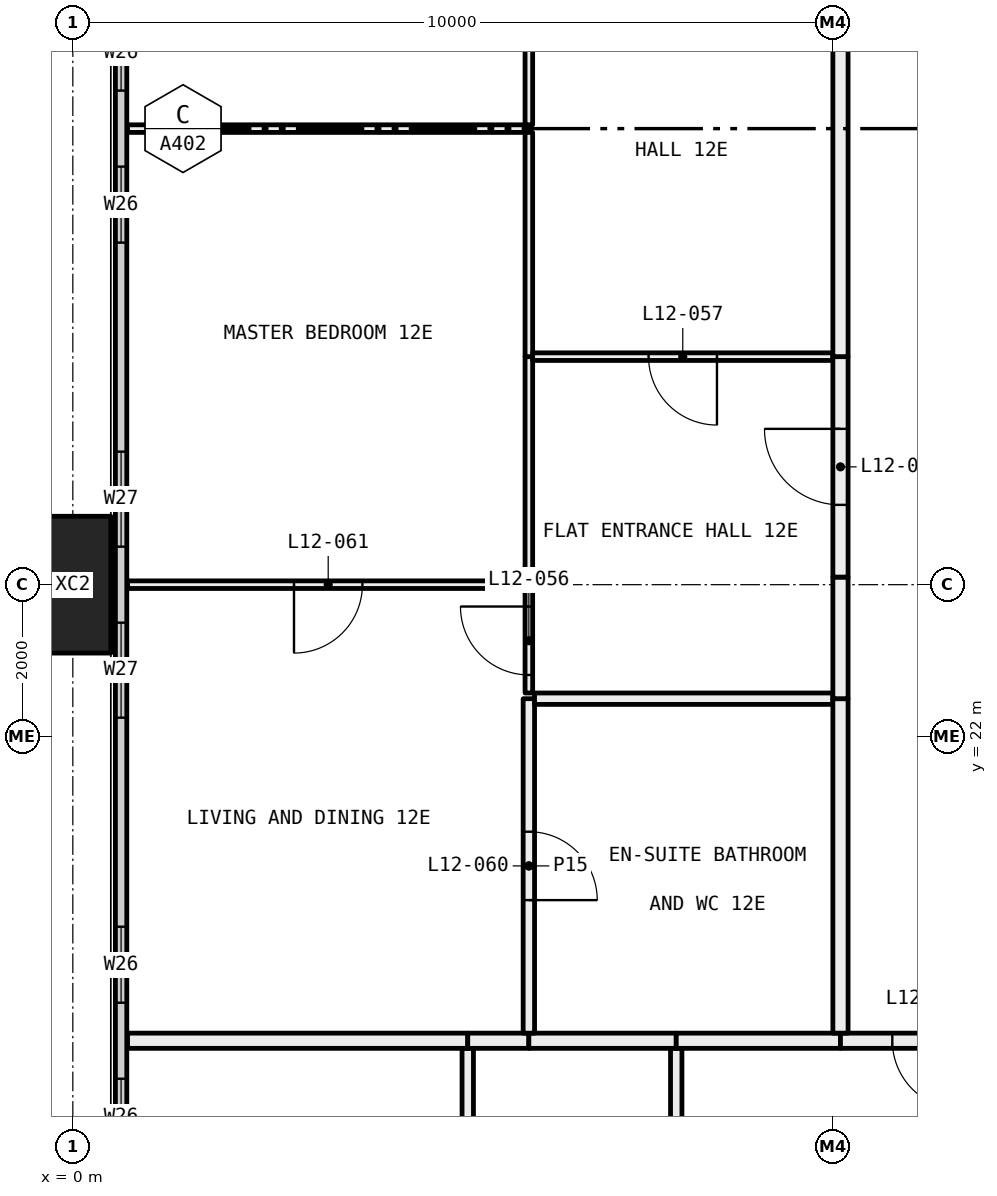
"""IFC4 building model, lengths in metres.
Left out: names, types, materials, properties, quantities, classifications, styles, units other than length and angle.
Written with IfcOpenShell. Run it as: python <this file> out.ifc"""

import sys

from ifc_helpers import new_model, si_unit, direction, frame, frame_2d, origin, origin_2d, place, context, subcontext, project, spatial, rectangle, hollow_rectangle, extrude, element, fill, save


model = new_model("IFC4")
c1 = context("Model", 3, precision=1e-05, world=origin(), true_north=direction((0.0, 1.0)))
c2 = subcontext(c1, "Body", "Model", "MODEL_VIEW")
j1 = project(units=[si_unit("LENGTHUNIT", "METRE"), si_unit("PLANEANGLEUNIT", "RADIAN")], contexts=[c1])
p1 = place(None, origin())
s1 = spatial("IfcSite", under=j1, at=p1, CompositionType="ELEMENT")
p2 = place(p1, origin())
s2 = spatial("IfcBuilding", under=s1, at=p2, CompositionType="ELEMENT")
p3 = place(p2, frame((0.0, 0.0, 54.15)))
s3 = spatial("IfcBuildingStorey", under=s2, at=p3, CompositionType="ELEMENT", Elevation=54.15)
p4 = place(p3, frame((0.0, 24.0, -0.4), z_axis=(0.0, 0.0, 1.0), x_axis=(0.0, 1.0, 0.0)))
e1 = element("IfcColumn", 1, at=p4, inside=s3, PredefinedType="COLUMN", context=c2, shape_type="SweptSolid", body=[
    extrude(hollow_rectangle(XDim=1.8, YDim=1.0, WallThickness=0.07, at=origin_2d()), origin(), (0.0, 0.0, 1.0), 3.45),
])
p5 = place(p3, frame((0.635, 6.71, 0.0), z_axis=(0.0, 0.0, 1.0), x_axis=(0.0, 1.0, 0.0)))
e2 = element("IfcWall", 2, at=p5, inside=s3, PredefinedType="ELEMENTEDWALL", context=c2, shape_type="SweptSolid", body=[
    extrude(rectangle(XDim=34.58, YDim=0.15, at=frame_2d((17.29, 0.0))), origin(), (0.0, 0.0, 1.0), 3.05),
])
p6 = place(p5, frame((0.29, 0.0, 0.45)))
e3 = element("IfcOpeningElement", 3, at=p6, cuts=e2, PredefinedType="OPENING", context=c2, shape_type="SweptSolid", body=[
    extrude(rectangle(XDim=4.5, YDim=2.55, at=frame_2d((2.25, 1.275))), frame((0.0, 0.085, 0.0), z_axis=(0.0, -1.0, 0.0), x_axis=(1.0, 0.0, 0.0)), (0.0, 0.0, 1.0), 0.17),
])
p7 = place(p5, frame((5.79, 0.0, 0.45)))
e4 = element("IfcOpeningElement", 4, at=p7, cuts=e2, PredefinedType="OPENING", context=c2, shape_type="SweptSolid", body=[
    extrude(rectangle(XDim=1.25, YDim=2.55, at=frame_2d((0.625, 1.275))), frame((0.0, 0.085, 0.0), z_axis=(0.0, -1.0, 0.0), x_axis=(1.0, 0.0, 0.0)), (0.0, 0.0, 1.0), 0.17),
])
p8 = place(p5, frame((9.79, 0.0, 0.45)))
e5 = element("IfcOpeningElement", 5, at=p8, cuts=e2, PredefinedType="OPENING", context=c2, shape_type="SweptSolid", body=[
    extrude(rectangle(XDim=1.0, YDim=2.55, at=frame_2d((0.5, 1.275))), frame((0.0, 0.085, 0.0), z_axis=(0.0, -1.0, 0.0), x_axis=(1.0, 0.0, 0.0)), (0.0, 0.0, 1.0), 0.17),
])
p9 = place(p5, frame((11.79, 0.0, 0.45)))
e6 = element("IfcOpeningElement", 6, at=p9, cuts=e2, PredefinedType="OPENING", context=c2, shape_type="SweptSolid", body=[
    extrude(rectangle(XDim=1.0, YDim=2.55, at=frame_2d((0.5, 1.275))), frame((0.0, 0.085, 0.0), z_axis=(0.0, -1.0, 0.0), x_axis=(1.0, 0.0, 0.0)), (0.0, 0.0, 1.0), 0.17),
])
p10 = place(p5, frame((15.54, 0.0, 0.45)))
e7 = element("IfcOpeningElement", 7, at=p10, cuts=e2, PredefinedType="OPENING", context=c2, shape_type="SweptSolid", body=[
    extrude(rectangle(XDim=1.25, YDim=2.55, at=frame_2d((0.625, 1.275))), frame((0.0, 0.085, 0.0), z_axis=(0.0, -1.0, 0.0), x_axis=(1.0, 0.0, 0.0)), (0.0, 0.0, 1.0), 0.17),
])
p11 = place(p5, frame((17.79, 0.0, 0.45)))
e8 = element("IfcOpeningElement", 8, at=p11, cuts=e2, PredefinedType="OPENING", context=c2, shape_type="SweptSolid", body=[
    extrude(rectangle(XDim=1.25, YDim=2.55, at=frame_2d((0.625, 1.275))), frame((0.0, 0.085, 0.0), z_axis=(0.0, -1.0, 0.0), x_axis=(1.0, 0.0, 0.0)), (0.0, 0.0, 1.0), 0.17),
])
p12 = place(p5, frame((21.79, 0.0, 0.45)))
e9 = element("IfcOpeningElement", 9, at=p12, cuts=e2, PredefinedType="OPENING", context=c2, shape_type="SweptSolid", body=[
    extrude(rectangle(XDim=1.0, YDim=2.55, at=frame_2d((0.5, 1.275))), frame((0.0, 0.085, 0.0), z_axis=(0.0, -1.0, 0.0), x_axis=(1.0, 0.0, 0.0)), (0.0, 0.0, 1.0), 0.17),
])
p13 = place(p5, frame((23.79, 0.0, 0.45)))
e10 = element("IfcOpeningElement", 10, at=p13, cuts=e2, PredefinedType="OPENING", context=c2, shape_type="SweptSolid", body=[
    extrude(rectangle(XDim=1.0, YDim=2.55, at=frame_2d((0.5, 1.275))), frame((0.0, 0.085, 0.0), z_axis=(0.0, -1.0, 0.0), x_axis=(1.0, 0.0, 0.0)), (0.0, 0.0, 1.0), 0.17),
])
p14 = place(p5, frame((27.54, 0.0, 0.45)))
e11 = element("IfcOpeningElement", 11, at=p14, cuts=e2, PredefinedType="OPENING", context=c2, shape_type="SweptSolid", body=[
    extrude(rectangle(XDim=1.25, YDim=2.55, at=frame_2d((0.625, 1.275))), frame((0.0, 0.085, 0.0), z_axis=(0.0, -1.0, 0.0), x_axis=(1.0, 0.0, 0.0)), (0.0, 0.0, 1.0), 0.17),
])
p15 = place(p5, frame((29.79, 0.0, 0.45)))
e12 = element("IfcOpeningElement", 12, at=p15, cuts=e2, PredefinedType="OPENING", context=c2, shape_type="SweptSolid", body=[
    extrude(rectangle(XDim=4.5, YDim=2.55, at=frame_2d((2.25, 1.275))), frame((0.0, 0.085, 0.0), z_axis=(0.0, -1.0, 0.0), x_axis=(1.0, 0.0, 0.0)), (0.0, 0.0, 1.0), 0.17),
])
p16 = place(p3, frame((5.196, 12.075, 0.0), z_axis=(0.0, 0.0, 1.0), x_axis=(0.0, 1.0, 0.0)))
e13 = element("IfcWall", 13, at=p16, inside=s3, PredefinedType="PARTITIONING", context=c2, shape_type="SweptSolid", body=[
    extrude(rectangle(XDim=5.825, YDim=0.15, at=frame_2d((2.913, 0.0))), origin(), (0.0, 0.0, 1.0), 2.45),
])
p17 = place(p3, frame((5.196, 18.0, 0.0), z_axis=(0.0, 0.0, 1.0), x_axis=(-1.0, 0.0, 0.0)))
e14 = element("IfcWall", 14, at=p17, inside=s3, PredefinedType="PARTITIONING", context=c2, shape_type="SweptSolid", body=[
    extrude(rectangle(XDim=4.476, YDim=0.2, at=frame_2d((2.238, 0.0))), origin(), (0.0, 0.0, 1.0), 3.05),
])
p18 = place(p3, frame((7.939, 14.712, 0.0), z_axis=(0.0, 0.0, 1.0), x_axis=(0.0, 1.0, 0.0)))
e15 = element("IfcWall", 15, at=p18, inside=s3, PredefinedType="PARTITIONING", context=c2, shape_type="SweptSolid", body=[
    extrude(rectangle(XDim=3.188, YDim=0.15, at=frame_2d((1.594, 0.0))), origin(), (0.0, 0.0, 1.0), 3.05),
])
p19 = place(p3, frame((6.0, 18.0, 0.0), z_axis=(0.0, 0.0, 1.0), x_axis=(-1.0, 0.0, 0.0)))
e16 = element("IfcWall", 16, at=p19, inside=s3, PredefinedType="PARTITIONING", context=c2, shape_type="SweptSolid", body=[
    extrude(rectangle(XDim=0.804, YDim=0.2, at=frame_2d((0.402, 0.0))), origin(), (0.0, 0.0, 1.0), 3.05),
])
p20 = place(p3, frame((7.939, 18.0, 0.0), z_axis=(0.0, 0.0, 1.0), x_axis=(-1.0, 0.0, 0.0)))
e17 = element("IfcWall", 17, at=p20, inside=s3, PredefinedType="PARTITIONING", context=c2, shape_type="SweptSolid", body=[
    extrude(rectangle(XDim=1.939, YDim=0.2, at=frame_2d((0.969, 0.0))), origin(), (0.0, 0.0, 1.0), 3.05),
])
p21 = place(p3, frame((10.1, 18.0, 0.0), z_axis=(0.0, 0.0, 1.0), x_axis=(-1.0, 0.0, 0.0)))
e18 = element("IfcWall", 18, at=p21, inside=s3, PredefinedType="PARTITIONING", context=c2, shape_type="SweptSolid", body=[
    extrude(rectangle(XDim=2.161, YDim=0.2, at=frame_2d((1.081, 0.0))), origin(), (0.0, 0.0, 1.0), 3.05),
])
p22 = place(p3, frame((12.364, 18.0, 0.0), z_axis=(0.0, 0.0, 1.0), x_axis=(-1.0, 0.0, 0.0)))
e19 = element("IfcWall", 19, at=p22, inside=s3, PredefinedType="PARTITIONING", context=c2, shape_type="SweptSolid", body=[
    extrude(rectangle(XDim=2.264, YDim=0.2, at=frame_2d((1.132, 0.0))), origin(), (0.0, 0.0, 1.0), 3.05),
])
p23 = place(p22, frame((0.682, 0.0, 0.0)))
e20 = element("IfcOpeningElement", 20, at=p23, cuts=e19, PredefinedType="OPENING", context=c2, shape_type="SweptSolid", body=[
    extrude(rectangle(XDim=0.9, YDim=2.1, at=frame_2d((0.45, 1.05))), frame((0.0, 0.11, 0.0), z_axis=(0.0, -1.0, 0.0), x_axis=(1.0, 0.0, 0.0)), (0.0, 0.0, 1.0), 0.22),
])
p24 = place(p3, frame((6.0, 24.0, 0.0), z_axis=(0.0, 0.0, 1.0), x_axis=(-1.0, 0.0, 0.0)))
e21 = element("IfcWall", 21, at=p24, inside=s3, PredefinedType="PARTITIONING", context=c2, shape_type="SweptSolid", body=[
    extrude(rectangle(XDim=5.28, YDim=0.1, at=frame_2d((2.64, 0.0))), origin(), (0.0, 0.0, 1.0), 2.45),
])
p25 = place(p24, frame((2.19, 0.0, 0.0)))
e22 = element("IfcOpeningElement", 22, at=p25, cuts=e21, PredefinedType="OPENING", context=c2, shape_type="SweptSolid", body=[
    extrude(rectangle(XDim=0.9, YDim=2.1, at=frame_2d((0.45, 1.05))), frame((0.0, 0.06, 0.0), z_axis=(0.0, -1.0, 0.0), x_axis=(1.0, 0.0, 0.0)), (0.0, 0.0, 1.0), 0.12),
])
p26 = place(p3, frame((6.0, 18.1, 0.0), z_axis=(0.0, 0.0, 1.0), x_axis=(0.0, 1.0, 0.0)))
e23 = element("IfcWall", 23, at=p26, inside=s3, PredefinedType="PARTITIONING", context=c2, shape_type="SweptSolid", body=[
    extrude(rectangle(XDim=4.4, YDim=0.15, at=frame_2d((2.2, 0.0))), origin(), (0.0, 0.0, 1.0), 3.05),
])
p27 = place(p26, frame((1.75, 0.0, 0.0)))
e24 = element("IfcOpeningElement", 24, at=p27, cuts=e23, PredefinedType="OPENING", context=c2, shape_type="SweptSolid", body=[
    extrude(rectangle(XDim=0.9, YDim=2.1, at=frame_2d((0.45, 1.05))), frame((0.0, 0.085, 0.0), z_axis=(0.0, -1.0, 0.0), x_axis=(1.0, 0.0, 0.0)), (0.0, 0.0, 1.0), 0.17),
])
p28 = place(p3, frame((6.0, 22.575, 0.0), z_axis=(0.0, 0.0, 1.0), x_axis=(0.0, 1.0, 0.0)))
e25 = element("IfcWall", 25, at=p28, inside=s3, PredefinedType="PARTITIONING", context=c2, shape_type="SweptSolid", body=[
    extrude(rectangle(XDim=1.375, YDim=0.1, at=frame_2d((0.688, 0.0))), origin(), (0.0, 0.0, 1.0), 2.45),
])
p29 = place(p28, frame((0.238, 0.0, 0.0)))
e26 = element("IfcOpeningElement", 26, at=p29, cuts=e25, PredefinedType="OPENING", context=c2, shape_type="SweptSolid", body=[
    extrude(rectangle(XDim=0.9, YDim=2.1, at=frame_2d((0.45, 1.05))), frame((0.0, 0.06, 0.0), z_axis=(0.0, -1.0, 0.0), x_axis=(1.0, 0.0, 0.0)), (0.0, 0.0, 1.0), 0.12),
])
p30 = place(p3, frame((6.0, 30.0, 0.0), z_axis=(0.0, 0.0, 1.0), x_axis=(-1.0, 0.0, 0.0)))
e27 = element("IfcWall", 27, at=p30, inside=s3, PredefinedType="PARTITIONING", context=c2, shape_type="SweptSolid", body=[
    extrude(rectangle(XDim=5.28, YDim=0.1, at=frame_2d((2.64, 0.0))), origin(), (0.0, 0.0, 1.0), 3.05),
])
p31 = place(p3, frame((6.0, 24.05, 0.0), z_axis=(0.0, 0.0, 1.0), x_axis=(0.0, 1.0, 0.0)))
e28 = element("IfcWall", 28, at=p31, inside=s3, PredefinedType="PARTITIONING", context=c2, shape_type="SweptSolid", body=[
    extrude(rectangle(XDim=2.95, YDim=0.1, at=frame_2d((1.475, 0.0))), origin(), (0.0, 0.0, 1.0), 2.45),
])
p32 = place(p3, frame((6.0, 27.0, 0.0), z_axis=(0.0, 0.0, 1.0), x_axis=(0.0, 1.0, 0.0)))
e29 = element("IfcWall", 29, at=p32, inside=s3, PredefinedType="PARTITIONING", context=c2, shape_type="SweptSolid", body=[
    extrude(rectangle(XDim=2.95, YDim=0.1, at=frame_2d((1.475, 0.0))), origin(), (0.0, 0.0, 1.0), 3.05),
])
p33 = place(p3, frame((6.0, 30.05, 0.0), z_axis=(0.0, 0.0, 1.0), x_axis=(0.0, 1.0, 0.0)))
e30 = element("IfcWall", 30, at=p33, inside=s3, PredefinedType="PARTITIONING", context=c2, shape_type="SweptSolid", body=[
    extrude(rectangle(XDim=5.9, YDim=0.1, at=frame_2d((2.95, 0.0))), origin(), (0.0, 0.0, 1.0), 2.45),
])
p34 = place(p33, frame((2.5, 0.0, 0.0)))
e31 = element("IfcOpeningElement", 31, at=p34, cuts=e30, PredefinedType="OPENING", context=c2, shape_type="SweptSolid", body=[
    extrude(rectangle(XDim=0.9, YDim=2.1, at=frame_2d((0.45, 1.05))), frame((0.0, 0.06, 0.0), z_axis=(0.0, -1.0, 0.0), x_axis=(1.0, 0.0, 0.0)), (0.0, 0.0, 1.0), 0.12),
])
p35 = place(p3, frame((10.0, 22.5, 0.0), z_axis=(0.0, 0.0, 1.0), x_axis=(-1.0, 0.0, 0.0)))
e32 = element("IfcWall", 32, at=p35, inside=s3, PredefinedType="PARTITIONING", context=c2, shape_type="SweptSolid", body=[
    extrude(rectangle(XDim=3.925, YDim=0.15, at=frame_2d((1.962, 0.0))), origin(), (0.0, 0.0, 1.0), 3.05),
])
p36 = place(p3, frame((10.1, 18.1, 0.0), z_axis=(0.0, 0.0, 1.0), x_axis=(0.0, 1.0, 0.0)))
e33 = element("IfcWall", 33, at=p36, inside=s3, PredefinedType="PARTITIONING", context=c2, shape_type="SweptSolid", body=[
    extrude(rectangle(XDim=4.4, YDim=0.2, at=frame_2d((2.2, 0.0))), origin(), (0.0, 0.0, 1.0), 3.05),
])
p37 = place(p3, frame((10.0, 27.0, 0.0), z_axis=(0.0, 0.0, 1.0), x_axis=(-1.0, 0.0, 0.0)))
e34 = element("IfcWall", 34, at=p37, inside=s3, PredefinedType="PARTITIONING", context=c2, shape_type="SweptSolid", body=[
    extrude(rectangle(XDim=3.95, YDim=0.1, at=frame_2d((1.975, 0.0))), origin(), (0.0, 0.0, 1.0), 3.05),
])
p38 = place(p37, frame((1.525, 0.0, 0.0)))
e35 = element("IfcOpeningElement", 35, at=p38, cuts=e34, PredefinedType="OPENING", context=c2, shape_type="SweptSolid", body=[
    extrude(rectangle(XDim=0.9, YDim=2.1, at=frame_2d((0.45, 1.05))), frame((0.0, 0.06, 0.0), z_axis=(0.0, -1.0, 0.0), x_axis=(1.0, 0.0, 0.0)), (0.0, 0.0, 1.0), 0.12),
])
p39 = place(p3, frame((10.1, 22.5, 0.0), z_axis=(0.0, 0.0, 1.0), x_axis=(0.0, 1.0, 0.0)))
e36 = element("IfcWall", 36, at=p39, inside=s3, PredefinedType="PARTITIONING", context=c2, shape_type="SweptSolid", body=[
    extrude(rectangle(XDim=1.6, YDim=0.2, at=frame_2d((0.8, 0.0))), origin(), (0.0, 0.0, 1.0), 2.45),
])
p40 = place(p3, frame((10.1, 24.1, 0.0), z_axis=(0.0, 0.0, 1.0), x_axis=(0.0, 1.0, 0.0)))
e37 = element("IfcWall", 37, at=p40, inside=s3, PredefinedType="PARTITIONING", context=c2, shape_type="SweptSolid", body=[
    extrude(rectangle(XDim=2.9, YDim=0.2, at=frame_2d((1.45, 0.0))), origin(), (0.0, 0.0, 1.0), 3.05),
])
p41 = place(p40, frame((0.95, 0.0, 0.0)))
e38 = element("IfcOpeningElement", 38, at=p41, cuts=e37, PredefinedType="OPENING", context=c2, shape_type="SweptSolid", body=[
    extrude(rectangle(XDim=1.0, YDim=2.1, at=frame_2d((0.5, 1.05))), frame((0.0, 0.11, 0.0), z_axis=(0.0, -1.0, 0.0), x_axis=(1.0, 0.0, 0.0)), (0.0, 0.0, 1.0), 0.22),
])
p42 = place(p3, frame((10.1, 27.0, 0.0), z_axis=(0.0, 0.0, 1.0), x_axis=(0.0, 1.0, 0.0)))
e39 = element("IfcWall", 39, at=p42, inside=s3, PredefinedType="PARTITIONING", context=c2, shape_type="SweptSolid", body=[
    extrude(rectangle(XDim=9.1, YDim=0.2, at=frame_2d((4.55, 0.0))), origin(), (0.0, 0.0, 1.0), 2.45),
])
p43 = place(p8, origin())
e40 = element("IfcWindow", 40, at=p43, inside=s3, PartitioningType="SINGLE_PANEL", PredefinedType="WINDOW", context=c2, shape_type="SweptSolid", body=[
    extrude(rectangle(XDim=1.0, YDim=2.55, at=frame_2d((0.5, 1.275))), frame((0.0, 0.03, 0.0), z_axis=(0.0, -1.0, 0.0), x_axis=(1.0, 0.0, 0.0)), (0.0, 0.0, 1.0), 0.06),
])
fill(e5, e40)
p44 = place(p9, origin())
e41 = element("IfcWindow", 41, at=p44, inside=s3, PartitioningType="SINGLE_PANEL", PredefinedType="WINDOW", context=c2, shape_type="SweptSolid", body=[
    extrude(rectangle(XDim=1.0, YDim=2.55, at=frame_2d((0.5, 1.275))), frame((0.0, 0.03, 0.0), z_axis=(0.0, -1.0, 0.0), x_axis=(1.0, 0.0, 0.0)), (0.0, 0.0, 1.0), 0.06),
])
fill(e6, e41)
p45 = place(p10, origin())
e42 = element("IfcWindow", 42, at=p45, inside=s3, PartitioningType="SINGLE_PANEL", PredefinedType="WINDOW", context=c2, shape_type="SweptSolid", body=[
    extrude(rectangle(XDim=1.25, YDim=2.55, at=frame_2d((0.625, 1.275))), frame((0.0, 0.03, 0.0), z_axis=(0.0, -1.0, 0.0), x_axis=(1.0, 0.0, 0.0)), (0.0, 0.0, 1.0), 0.06),
])
fill(e7, e42)
p46 = place(p11, origin())
e43 = element("IfcWindow", 43, at=p46, inside=s3, PartitioningType="SINGLE_PANEL", PredefinedType="WINDOW", context=c2, shape_type="SweptSolid", body=[
    extrude(rectangle(XDim=1.25, YDim=2.55, at=frame_2d((0.625, 1.275))), frame((0.0, 0.03, 0.0), z_axis=(0.0, -1.0, 0.0), x_axis=(1.0, 0.0, 0.0)), (0.0, 0.0, 1.0), 0.06),
])
fill(e8, e43)
p47 = place(p12, origin())
e44 = element("IfcWindow", 44, at=p47, inside=s3, PartitioningType="SINGLE_PANEL", PredefinedType="WINDOW", context=c2, shape_type="SweptSolid", body=[
    extrude(rectangle(XDim=1.0, YDim=2.55, at=frame_2d((0.5, 1.275))), frame((0.0, 0.03, 0.0), z_axis=(0.0, -1.0, 0.0), x_axis=(1.0, 0.0, 0.0)), (0.0, 0.0, 1.0), 0.06),
])
fill(e9, e44)
p48 = place(p13, origin())
e45 = element("IfcWindow", 45, at=p48, inside=s3, PartitioningType="SINGLE_PANEL", PredefinedType="WINDOW", context=c2, shape_type="SweptSolid", body=[
    extrude(rectangle(XDim=1.0, YDim=2.55, at=frame_2d((0.5, 1.275))), frame((0.0, 0.03, 0.0), z_axis=(0.0, -1.0, 0.0), x_axis=(1.0, 0.0, 0.0)), (0.0, 0.0, 1.0), 0.06),
])
fill(e10, e45)
p49 = place(p23, origin())
e46 = element("IfcDoor", 46, at=p49, inside=s3, OperationType="SINGLE_SWING_RIGHT", PredefinedType="DOOR", context=c2, shape_type="SweptSolid", body=[
    extrude(rectangle(XDim=0.9, YDim=2.1, at=frame_2d((0.45, 1.05))), frame((0.0, 0.025, 0.0), z_axis=(0.0, -1.0, 0.0), x_axis=(1.0, 0.0, 0.0)), (0.0, 0.0, 1.0), 0.05),
])
fill(e20, e46)
p50 = place(p41, origin())
e47 = element("IfcDoor", 47, at=p50, inside=s3, OperationType="SINGLE_SWING_LEFT", PredefinedType="DOOR", context=c2, shape_type="SweptSolid", body=[
    extrude(rectangle(XDim=1.0, YDim=2.1, at=frame_2d((0.5, 1.05))), frame((0.0, 0.025, 0.0), z_axis=(0.0, -1.0, 0.0), x_axis=(1.0, 0.0, 0.0)), (0.0, 0.0, 1.0), 0.05),
])
fill(e38, e47)
p51 = place(p29, origin())
e48 = element("IfcDoor", 48, at=p51, inside=s3, OperationType="SINGLE_SWING_LEFT", PredefinedType="DOOR", context=c2, shape_type="SweptSolid", body=[
    extrude(rectangle(XDim=0.9, YDim=2.1, at=frame_2d((0.45, 1.05))), frame((0.0, 0.025, 0.0), z_axis=(0.0, -1.0, 0.0), x_axis=(1.0, 0.0, 0.0)), (0.0, 0.0, 1.0), 0.05),
])
fill(e26, e48)
p52 = place(p38, origin())
e49 = element("IfcDoor", 49, at=p52, inside=s3, OperationType="SINGLE_SWING_RIGHT", PredefinedType="DOOR", context=c2, shape_type="SweptSolid", body=[
    extrude(rectangle(XDim=0.9, YDim=2.1, at=frame_2d((0.45, 1.05))), frame((0.0, 0.025, 0.0), z_axis=(0.0, -1.0, 0.0), x_axis=(1.0, 0.0, 0.0)), (0.0, 0.0, 1.0), 0.05),
])
fill(e35, e49)
p53 = place(p27, frame((0.9, 0.0, 0.0), x_axis=(-1.0, 0.0, 0.0)))
e50 = element("IfcDoor", 50, at=p53, inside=s3, OperationType="SINGLE_SWING_LEFT", PredefinedType="DOOR", context=c2, shape_type="SweptSolid", body=[
    extrude(rectangle(XDim=0.9, YDim=2.1, at=frame_2d((0.45, 1.05))), frame((0.0, 0.025, 0.0), z_axis=(0.0, -1.0, 0.0), x_axis=(1.0, 0.0, 0.0)), (0.0, 0.0, 1.0), 0.05),
])
fill(e24, e50)
p54 = place(p25, origin())
e51 = element("IfcDoor", 51, at=p54, inside=s3, OperationType="SINGLE_SWING_LEFT", PredefinedType="DOOR", context=c2, shape_type="SweptSolid", body=[
    extrude(rectangle(XDim=0.9, YDim=2.1, at=frame_2d((0.45, 1.05))), frame((0.0, 0.025, 0.0), z_axis=(0.0, -1.0, 0.0), x_axis=(1.0, 0.0, 0.0)), (0.0, 0.0, 1.0), 0.05),
])
fill(e22, e51)
save(model, sys.argv[1])
